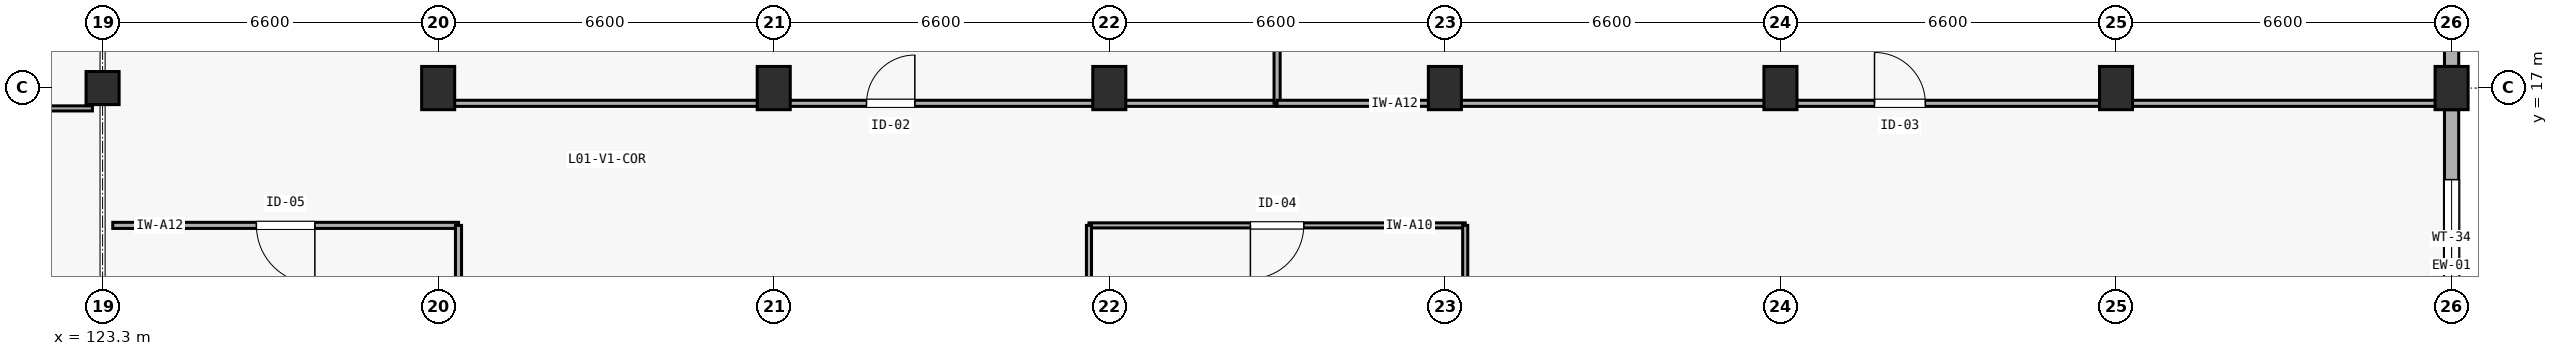
"""IFC4 building model, lengths in metres.
Left out: names, types, materials, properties, quantities, classifications, styles, units other than length and angle.
Written with IfcOpenShell. Run it as: python <this file> out.ifc"""

import sys

from ifc_helpers import new_model, si_unit, direction, frame, frame_2d, origin, origin_2d, place, context, subcontext, project, spatial, rectangle, extrude, element, fill, save


model = new_model("IFC4")
c1 = context("Model", 3, precision=1e-05, world=origin(), true_north=direction((0.0, 1.0)))
c2 = subcontext(c1, "Body", "Model", "MODEL_VIEW")
j1 = project(units=[si_unit("LENGTHUNIT", "METRE"), si_unit("PLANEANGLEUNIT", "RADIAN")], contexts=[c1])
p1 = place(None, origin())
s1 = spatial("IfcSite", under=j1, at=p1, CompositionType="ELEMENT")
p2 = place(p1, origin())
s2 = spatial("IfcBuilding", under=s1, at=p2, CompositionType="ELEMENT")
p3 = place(p2, frame((0.0, 0.0, 4.2)))
s3 = spatial("IfcBuildingStorey", under=s2, at=p3, CompositionType="ELEMENT", Elevation=4.2)
p4 = place(p3, frame((123.3, 17.0, 0.0), z_axis=(0.0, 0.0, 1.0), x_axis=(1.0, 0.0, 0.0)))
e1 = element("IfcColumn", 1, at=p4, inside=s3, PredefinedType="COLUMN", context=c2, shape_type="SweptSolid", body=[
    extrude(rectangle(XDim=0.65, YDim=0.65, at=origin_2d()), origin(), (0.0, 0.0, 1.0), 4.2),
])
for number, where, z_axis, x_axis in (
    (2, (129.9, 17.0, 0.0), (0.0, 0.0, 1.0), (1.0, 0.0, 0.0)),
    (3, (136.5, 17.0, 0.0), (0.0, 0.0, 1.0), (1.0, 0.0, 0.0)),
    (4, (143.1, 17.0, 0.0), (0.0, 0.0, 1.0), (1.0, 0.0, 0.0)),
    (5, (149.7, 17.0, 0.0), (0.0, 0.0, 1.0), (1.0, 0.0, 0.0)),
    (6, (156.3, 17.0, 0.0), (0.0, 0.0, 1.0), (1.0, 0.0, 0.0)),
    (7, (162.9, 17.0, 0.0), (0.0, 0.0, 1.0), (1.0, 0.0, 0.0)),
    (8, (169.5, 17.0, 0.0), (0.0, 0.0, 1.0), (1.0, 0.0, 0.0)),
):
    element("IfcColumn", number, at=place(p3, frame(where, z_axis=z_axis, x_axis=x_axis)), inside=s3, PredefinedType="COLUMN", context=c2, shape_type="SweptSolid", body=[
        extrude(rectangle(XDim=0.65, YDim=0.85, at=origin_2d()), origin(), (0.0, 0.0, 1.0), 4.2),
    ])
p5 = place(p3, frame((169.5, 10.425, 0.0), z_axis=(0.0, 0.0, 1.0), x_axis=(0.0, 1.0, 0.0)))
e9 = element("IfcWall", 9, at=p5, inside=s3, PredefinedType="SOLIDWALL", context=c2, shape_type="SweptSolid", body=[
    extrude(rectangle(XDim=6.15, YDim=0.28, at=frame_2d((3.075, 0.0))), origin(), (0.0, 0.0, 1.0), 3.85),
])
p6 = place(p5, frame((1.375, 0.0, 0.85)))
e10 = element("IfcOpeningElement", 10, at=p6, cuts=e9, PredefinedType="OPENING", context=c2, shape_type="SweptSolid", body=[
    extrude(rectangle(XDim=3.4, YDim=1.2, at=frame_2d((1.7, 0.6))), frame((0.0, 0.15, 0.0), z_axis=(0.0, -1.0, 0.0), x_axis=(1.0, 0.0, 0.0)), (0.0, 0.0, 1.0), 0.3),
])
p7 = place(p3, frame((169.5, 17.425, 0.0), z_axis=(0.0, 0.0, 1.0), x_axis=(0.0, 1.0, 0.0)))
e11 = element("IfcWall", 11, at=p7, inside=s3, PredefinedType="SOLIDWALL", context=c2, shape_type="SweptSolid", body=[
    extrude(rectangle(XDim=6.15, YDim=0.28, at=frame_2d((3.075, 0.0))), origin(), (0.0, 0.0, 1.0), 3.85),
])
p8 = place(p7, frame((2.6, 0.0, 0.85)))
e12 = element("IfcOpeningElement", 12, at=p8, cuts=e11, PredefinedType="OPENING", context=c2, shape_type="SweptSolid", body=[
    extrude(rectangle(XDim=0.95, YDim=1.55, at=frame_2d((0.475, 0.775))), frame((0.0, 0.15, 0.0), z_axis=(0.0, -1.0, 0.0), x_axis=(1.0, 0.0, 0.0)), (0.0, 0.0, 1.0), 0.3),
])
p9 = place(p3, frame((130.0, 16.7, 0.0), z_axis=(0.0, 0.0, 1.0), x_axis=(1.0, 0.0, 0.0)))
e13 = element("IfcWall", 13, at=p9, inside=s3, PredefinedType="PARTITIONING", context=c2, shape_type="SweptSolid", body=[
    extrude(rectangle(XDim=16.4, YDim=0.12, at=frame_2d((8.2, 0.0))), origin(), (0.0, 0.0, 1.0), 3.9),
])
p10 = place(p9, frame((8.325, 0.0, 0.0)))
e14 = element("IfcOpeningElement", 14, at=p10, cuts=e13, PredefinedType="OPENING", context=c2, shape_type="SweptSolid", body=[
    extrude(rectangle(XDim=0.95, YDim=2.1, at=frame_2d((0.475, 1.05))), frame((0.0, 0.07, 0.0), z_axis=(0.0, -1.0, 0.0), x_axis=(1.0, 0.0, 0.0)), (0.0, 0.0, 1.0), 0.14),
])
p11 = place(p3, frame((146.4, 16.7, 0.0), z_axis=(0.0, 0.0, 1.0), x_axis=(0.0, 1.0, 0.0)))
e15 = element("IfcWall", 15, at=p11, inside=s3, PredefinedType="PARTITIONING", context=c2, shape_type="SweptSolid", body=[
    extrude(rectangle(XDim=7.1, YDim=0.12, at=frame_2d((3.55, 0.0))), origin(), (0.0, 0.0, 1.0), 3.9),
])
p12 = place(p3, frame((146.4, 16.7, 0.0), z_axis=(0.0, 0.0, 1.0), x_axis=(1.0, 0.0, 0.0)))
e16 = element("IfcWall", 16, at=p12, inside=s3, PredefinedType="PARTITIONING", context=c2, shape_type="SweptSolid", body=[
    extrude(rectangle(XDim=22.9, YDim=0.12, at=frame_2d((11.45, 0.0))), origin(), (0.0, 0.0, 1.0), 3.9),
])
p13 = place(p12, frame((11.75, 0.0, 0.0)))
e17 = element("IfcOpeningElement", 17, at=p13, cuts=e16, PredefinedType="OPENING", context=c2, shape_type="SweptSolid", body=[
    extrude(rectangle(XDim=1.0, YDim=2.1, at=frame_2d((0.5, 1.05))), frame((0.0, 0.07, 0.0), z_axis=(0.0, -1.0, 0.0), x_axis=(1.0, 0.0, 0.0)), (0.0, 0.0, 1.0), 0.14),
])
p14 = place(p3, frame((142.7, 14.3, 0.0), z_axis=(0.0, 0.0, 1.0), x_axis=(1.0, 0.0, 0.0)))
e18 = element("IfcWall", 18, at=p14, inside=s3, PredefinedType="PARTITIONING", context=c2, shape_type="SweptSolid", body=[
    extrude(rectangle(XDim=7.4, YDim=0.1, at=frame_2d((3.7, 0.0))), origin(), (0.0, 0.0, 1.0), 3.9),
])
p15 = place(p14, frame((3.175, 0.0, 0.0)))
e19 = element("IfcOpeningElement", 19, at=p15, cuts=e18, PredefinedType="OPENING", context=c2, shape_type="SweptSolid", body=[
    extrude(rectangle(XDim=1.05, YDim=2.15, at=frame_2d((0.525, 1.075))), frame((0.0, 0.06, 0.0), z_axis=(0.0, -1.0, 0.0), x_axis=(1.0, 0.0, 0.0)), (0.0, 0.0, 1.0), 0.12),
])
for number, where, z_axis, x_axis in (
    (20, (142.7, 3.2, 0.0), (0.0, 0.0, 1.0), (0.0, 1.0, 0.0)),
    (21, (150.1, 3.2, 0.0), (0.0, 0.0, 1.0), (0.0, 1.0, 0.0)),
):
    element("IfcWall", number, at=place(p3, frame(where, z_axis=z_axis, x_axis=x_axis)), inside=s3, PredefinedType="PARTITIONING", context=c2, shape_type="SweptSolid", body=[
        extrude(rectangle(XDim=11.1, YDim=0.1, at=frame_2d((5.55, 0.0))), origin(), (0.0, 0.0, 1.0), 3.9),
    ])
p16 = place(p3, frame((123.5, 14.3, 0.0), z_axis=(0.0, 0.0, 1.0), x_axis=(1.0, 0.0, 0.0)))
e22 = element("IfcWall", 22, at=p16, inside=s3, PredefinedType="PARTITIONING", context=c2, shape_type="SweptSolid", body=[
    extrude(rectangle(XDim=6.8, YDim=0.12, at=frame_2d((3.4, 0.0))), origin(), (0.0, 0.0, 1.0), 3.9),
])
p17 = place(p16, frame((2.825, 0.0, 0.0)))
e23 = element("IfcOpeningElement", 23, at=p17, cuts=e22, PredefinedType="OPENING", context=c2, shape_type="SweptSolid", body=[
    extrude(rectangle(XDim=1.15, YDim=2.15, at=frame_2d((0.575, 1.075))), frame((0.0, 0.07, 0.0), z_axis=(0.0, -1.0, 0.0), x_axis=(1.0, 0.0, 0.0)), (0.0, 0.0, 1.0), 0.14),
])
p18 = place(p3, frame((130.3, 3.2, 0.0), z_axis=(0.0, 0.0, 1.0), x_axis=(0.0, 1.0, 0.0)))
e24 = element("IfcWall", 24, at=p18, inside=s3, PredefinedType="PARTITIONING", context=c2, shape_type="SweptSolid", body=[
    extrude(rectangle(XDim=11.1, YDim=0.12, at=frame_2d((5.55, 0.0))), origin(), (0.0, 0.0, 1.0), 3.9),
])
p19 = place(p3, frame((106.5, 16.6, 0.0), z_axis=(0.0, 0.0, 1.0), x_axis=(1.0, 0.0, 0.0)))
e25 = element("IfcWall", 25, at=p19, inside=s3, PredefinedType="PARTITIONING", context=c2, shape_type="SweptSolid", body=[
    extrude(rectangle(XDim=16.6, YDim=0.1, at=frame_2d((8.3, 0.0))), origin(), (0.0, 0.0, 1.0), 3.9),
])
p20 = place(p6, origin())
e26 = element("IfcWindow", 26, at=p20, inside=s3, PartitioningType="SINGLE_PANEL", PredefinedType="WINDOW", context=c2, shape_type="SweptSolid", body=[
    extrude(rectangle(XDim=3.4, YDim=1.2, at=frame_2d((1.7, 0.6))), frame((0.0, 0.03, 0.0), z_axis=(0.0, -1.0, 0.0), x_axis=(1.0, 0.0, 0.0)), (0.0, 0.0, 1.0), 0.06),
])
fill(e10, e26)
p21 = place(p10, origin())
e27 = element("IfcDoor", 27, at=p21, inside=s3, OperationType="SINGLE_SWING_RIGHT", PredefinedType="DOOR", context=c2, shape_type="SweptSolid", body=[
    extrude(rectangle(XDim=0.95, YDim=2.1, at=frame_2d((0.475, 1.05))), frame((0.0, 0.025, 0.0), z_axis=(0.0, -1.0, 0.0), x_axis=(1.0, 0.0, 0.0)), (0.0, 0.0, 1.0), 0.05),
])
fill(e14, e27)
p22 = place(p13, origin())
e28 = element("IfcDoor", 28, at=p22, inside=s3, OperationType="SINGLE_SWING_LEFT", PredefinedType="DOOR", context=c2, shape_type="SweptSolid", body=[
    extrude(rectangle(XDim=1.0, YDim=2.1, at=frame_2d((0.5, 1.05))), frame((0.0, 0.025, 0.0), z_axis=(0.0, -1.0, 0.0), x_axis=(1.0, 0.0, 0.0)), (0.0, 0.0, 1.0), 0.05),
])
fill(e17, e28)
p23 = place(p15, frame((1.05, 0.0, 0.0), z_axis=(0.0, 0.0, 1.0), x_axis=(-1.0, 0.0, 0.0)))
e29 = element("IfcDoor", 29, at=p23, inside=s3, OperationType="SINGLE_SWING_RIGHT", PredefinedType="DOOR", context=c2, shape_type="SweptSolid", body=[
    extrude(rectangle(XDim=1.05, YDim=2.15, at=frame_2d((0.525, 1.075))), frame((0.0, 0.025, 0.0), z_axis=(0.0, -1.0, 0.0), x_axis=(1.0, 0.0, 0.0)), (0.0, 0.0, 1.0), 0.05),
])
fill(e19, e29)
p24 = place(p17, frame((1.15, 0.0, 0.0), z_axis=(0.0, 0.0, 1.0), x_axis=(-1.0, 0.0, 0.0)))
e30 = element("IfcDoor", 30, at=p24, inside=s3, OperationType="SINGLE_SWING_LEFT", PredefinedType="DOOR", context=c2, shape_type="SweptSolid", body=[
    extrude(rectangle(XDim=1.15, YDim=2.15, at=frame_2d((0.575, 1.075))), frame((0.0, 0.025, 0.0), z_axis=(0.0, -1.0, 0.0), x_axis=(1.0, 0.0, 0.0)), (0.0, 0.0, 1.0), 0.05),
])
fill(e23, e30)
save(model, sys.argv[1])
